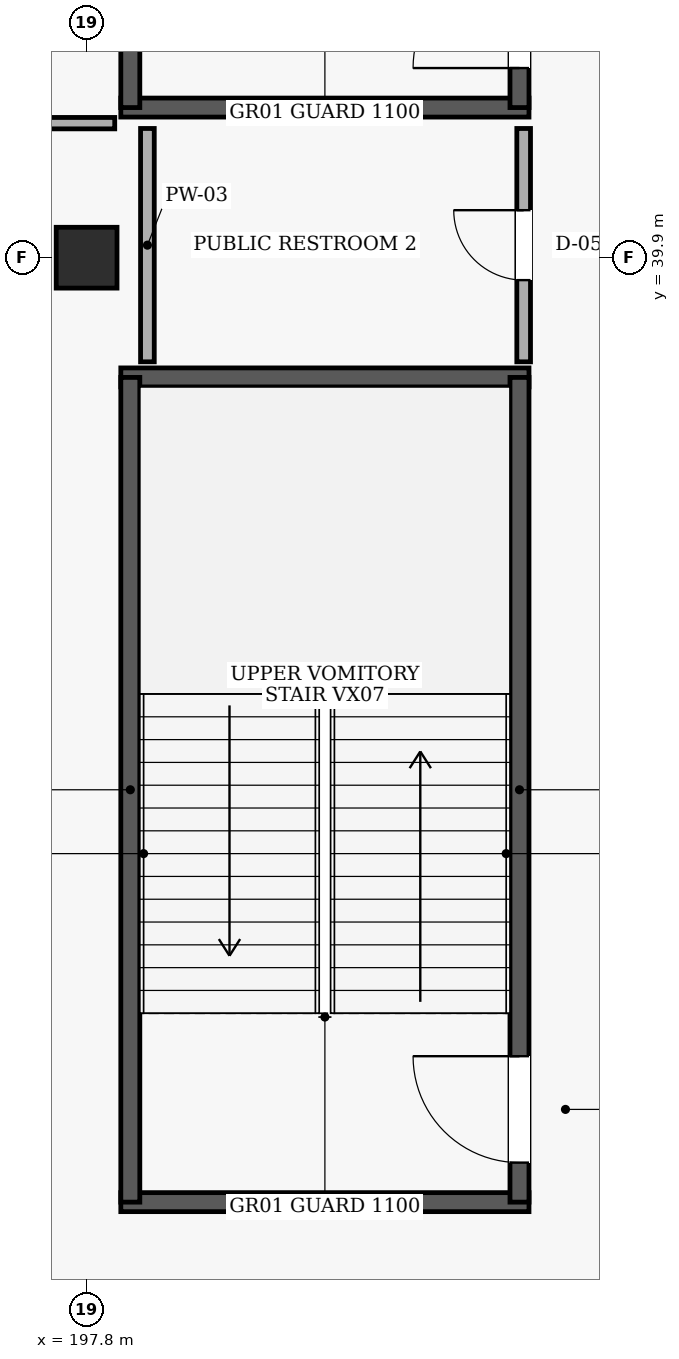
"""IFC4 building model, lengths in metres.
Left out: names, types, materials, properties, quantities, classifications, styles, units other than length and angle.
Written with IfcOpenShell. Run it as: python <this file> out.ifc"""

import sys

from ifc_helpers import new_model, si_unit, direction, frame, frame_2d, origin, origin_2d, place, context, subcontext, project, spatial, rectangle, extrude, element, fill, save


model = new_model("IFC4")
c1 = context("Model", 3, precision=1e-05, world=origin(), true_north=direction((0.0, 1.0)))
c2 = subcontext(c1, "Body", "Model", "MODEL_VIEW")
j1 = project(units=[si_unit("LENGTHUNIT", "METRE"), si_unit("PLANEANGLEUNIT", "RADIAN")], contexts=[c1])
p1 = place(None, origin())
s1 = spatial("IfcSite", under=j1, at=p1, CompositionType="ELEMENT")
p2 = place(p1, origin())
s2 = spatial("IfcBuilding", under=s1, at=p2, CompositionType="ELEMENT")
p3 = place(p2, frame((0.0, 0.0, 10.2)))
s3 = spatial("IfcBuildingStorey", under=s2, at=p3, CompositionType="ELEMENT", Elevation=10.2)
p4 = place(p3, frame((197.8, 39.9, 0.0), z_axis=(0.0, 0.0, 1.0), x_axis=(1.0, 0.0, 0.0)))
e1 = element("IfcColumn", 1, at=p4, inside=s3, PredefinedType="COLUMN", context=c2, shape_type="SweptSolid", body=[
    extrude(rectangle(XDim=0.8, YDim=0.8, at=origin_2d()), origin(), (0.0, 0.0, 1.0), 4.8),
])
for number, where, z_axis, x_axis in (
    (2, (198.25, 27.475, 0.0), (0.0, 0.0, 1.0), (1.0, 0.0, 0.0)),
    (3, (203.62, 38.325, 0.0), (0.0, 0.0, 1.0), (-1.0, 0.0, 0.0)),
):
    element("IfcWall", number, at=place(p3, frame(where, z_axis=z_axis, x_axis=x_axis)), inside=s3, PredefinedType="SHEAR", context=c2, shape_type="SweptSolid", body=[
        extrude(rectangle(XDim=5.37, YDim=0.25, at=frame_2d((2.685, 0.0))), origin(), (0.0, 0.0, 1.0), 4.48),
    ])
p5 = place(p3, frame((198.375, 27.475, 0.0), z_axis=(0.0, 0.0, 1.0), x_axis=(0.0, 1.0, 0.0)))
e4 = element("IfcWall", 4, at=p5, inside=s3, PredefinedType="SHEAR", context=c2, shape_type="SweptSolid", body=[
    extrude(rectangle(XDim=10.85, YDim=0.25, at=frame_2d((5.425, 0.0))), origin(), (0.0, 0.0, 1.0), 4.48),
])
p6 = place(p3, frame((203.495, 27.475, 0.0), z_axis=(0.0, 0.0, 1.0), x_axis=(0.0, 1.0, 0.0)))
e5 = element("IfcWall", 5, at=p6, inside=s3, PredefinedType="SHEAR", context=c2, shape_type="SweptSolid", body=[
    extrude(rectangle(XDim=10.85, YDim=0.25, at=frame_2d((5.425, 0.0))), origin(), (0.0, 0.0, 1.0), 4.48),
])
p7 = place(p6, frame((0.52, 0.0, 0.0)))
e6 = element("IfcOpeningElement", 6, at=p7, cuts=e5, PredefinedType="OPENING", context=c2, shape_type="SweptSolid", body=[
    extrude(rectangle(XDim=1.4, YDim=2.15, at=frame_2d((0.7, 1.075))), frame((0.0, 0.135, 0.0), z_axis=(0.0, -1.0, 0.0), x_axis=(1.0, 0.0, 0.0)), (0.0, 0.0, 1.0), 0.27),
])
p8 = place(p3, frame((198.25, 41.875, 0.0), z_axis=(0.0, 0.0, 1.0), x_axis=(1.0, 0.0, 0.0)))
e7 = element("IfcWall", 7, at=p8, inside=s3, PredefinedType="SHEAR", context=c2, shape_type="SweptSolid", body=[
    extrude(rectangle(XDim=5.37, YDim=0.25, at=frame_2d((2.685, 0.0))), origin(), (0.0, 0.0, 1.0), 4.48),
])
p9 = place(p3, frame((198.375, 41.875, 0.0), z_axis=(0.0, 0.0, 1.0), x_axis=(0.0, 1.0, 0.0)))
e8 = element("IfcWall", 8, at=p9, inside=s3, PredefinedType="SHEAR", context=c2, shape_type="SweptSolid", body=[
    extrude(rectangle(XDim=10.85, YDim=0.25, at=frame_2d((5.425, 0.0))), origin(), (0.0, 0.0, 1.0), 4.48),
])
p10 = place(p3, frame((203.495, 41.875, 0.0), z_axis=(0.0, 0.0, 1.0), x_axis=(0.0, 1.0, 0.0)))
e9 = element("IfcWall", 9, at=p10, inside=s3, PredefinedType="SHEAR", context=c2, shape_type="SweptSolid", body=[
    extrude(rectangle(XDim=10.85, YDim=0.25, at=frame_2d((5.425, 0.0))), origin(), (0.0, 0.0, 1.0), 4.48),
])
p11 = place(p10, frame((0.52, 0.0, 0.0)))
e10 = element("IfcOpeningElement", 10, at=p11, cuts=e9, PredefinedType="OPENING", context=c2, shape_type="SweptSolid", body=[
    extrude(rectangle(XDim=1.4, YDim=2.15, at=frame_2d((0.7, 1.075))), frame((0.0, 0.135, 0.0), z_axis=(0.0, -1.0, 0.0), x_axis=(1.0, 0.0, 0.0)), (0.0, 0.0, 1.0), 0.27),
])
p12 = place(p3, frame((203.55, 38.53, 0.0), z_axis=(0.0, 0.0, 1.0), x_axis=(0.0, 1.0, 0.0)))
e11 = element("IfcWall", 11, at=p12, inside=s3, PredefinedType="PARTITIONING", context=c2, shape_type="SweptSolid", body=[
    extrude(rectangle(XDim=3.07, YDim=0.18, at=frame_2d((1.535, 0.0))), origin(), (0.0, 0.0, 1.0), 4.48),
])
p13 = place(p12, frame((1.075, 0.0, 0.0)))
e12 = element("IfcOpeningElement", 12, at=p13, cuts=e11, PredefinedType="OPENING", context=c2, shape_type="SweptSolid", body=[
    extrude(rectangle(XDim=0.92, YDim=2.1, at=frame_2d((0.46, 1.05))), frame((0.0, 0.1, 0.0), z_axis=(0.0, -1.0, 0.0), x_axis=(1.0, 0.0, 0.0)), (0.0, 0.0, 1.0), 0.2),
])
p14 = place(p3, frame((198.6, 41.6, 0.0), z_axis=(0.0, 0.0, 1.0), x_axis=(0.0, -1.0, 0.0)))
e13 = element("IfcWall", 13, at=p14, inside=s3, PredefinedType="PARTITIONING", context=c2, shape_type="SweptSolid", body=[
    extrude(rectangle(XDim=3.07, YDim=0.18, at=frame_2d((1.535, 0.0))), origin(), (0.0, 0.0, 1.0), 4.48),
])
p15 = place(p3, frame((183.4, 41.67, 0.0), z_axis=(0.0, 0.0, 1.0), x_axis=(1.0, 0.0, 0.0)))
e14 = element("IfcWall", 14, at=p15, inside=s3, PredefinedType="PARTITIONING", context=c2, shape_type="SweptSolid", body=[
    extrude(rectangle(XDim=14.77, YDim=0.15, at=frame_2d((7.385, 0.0))), origin(), (0.0, 0.0, 1.0), 4.48),
])
p16 = place(p7, origin())
e15 = element("IfcDoor", 15, at=p16, inside=s3, OperationType="SINGLE_SWING_RIGHT", PredefinedType="DOOR", context=c2, shape_type="SweptSolid", body=[
    extrude(rectangle(XDim=1.4, YDim=2.15, at=frame_2d((0.7, 1.075))), frame((0.0, 0.025, 0.0), z_axis=(0.0, -1.0, 0.0), x_axis=(1.0, 0.0, 0.0)), (0.0, 0.0, 1.0), 0.05),
])
fill(e6, e15)
p17 = place(p11, origin())
e16 = element("IfcDoor", 16, at=p17, inside=s3, OperationType="SINGLE_SWING_LEFT", PredefinedType="DOOR", context=c2, shape_type="SweptSolid", body=[
    extrude(rectangle(XDim=1.4, YDim=2.15, at=frame_2d((0.7, 1.075))), frame((0.0, 0.025, 0.0), z_axis=(0.0, -1.0, 0.0), x_axis=(1.0, 0.0, 0.0)), (0.0, 0.0, 1.0), 0.05),
])
fill(e10, e16)
p18 = place(p13, origin())
e17 = element("IfcDoor", 17, at=p18, inside=s3, OperationType="SINGLE_SWING_RIGHT", PredefinedType="DOOR", context=c2, shape_type="SweptSolid", body=[
    extrude(rectangle(XDim=0.92, YDim=2.1, at=frame_2d((0.46, 1.05))), frame((0.0, 0.025, 0.0), z_axis=(0.0, -1.0, 0.0), x_axis=(1.0, 0.0, 0.0)), (0.0, 0.0, 1.0), 0.05),
])
fill(e12, e17)
save(model, sys.argv[1])
